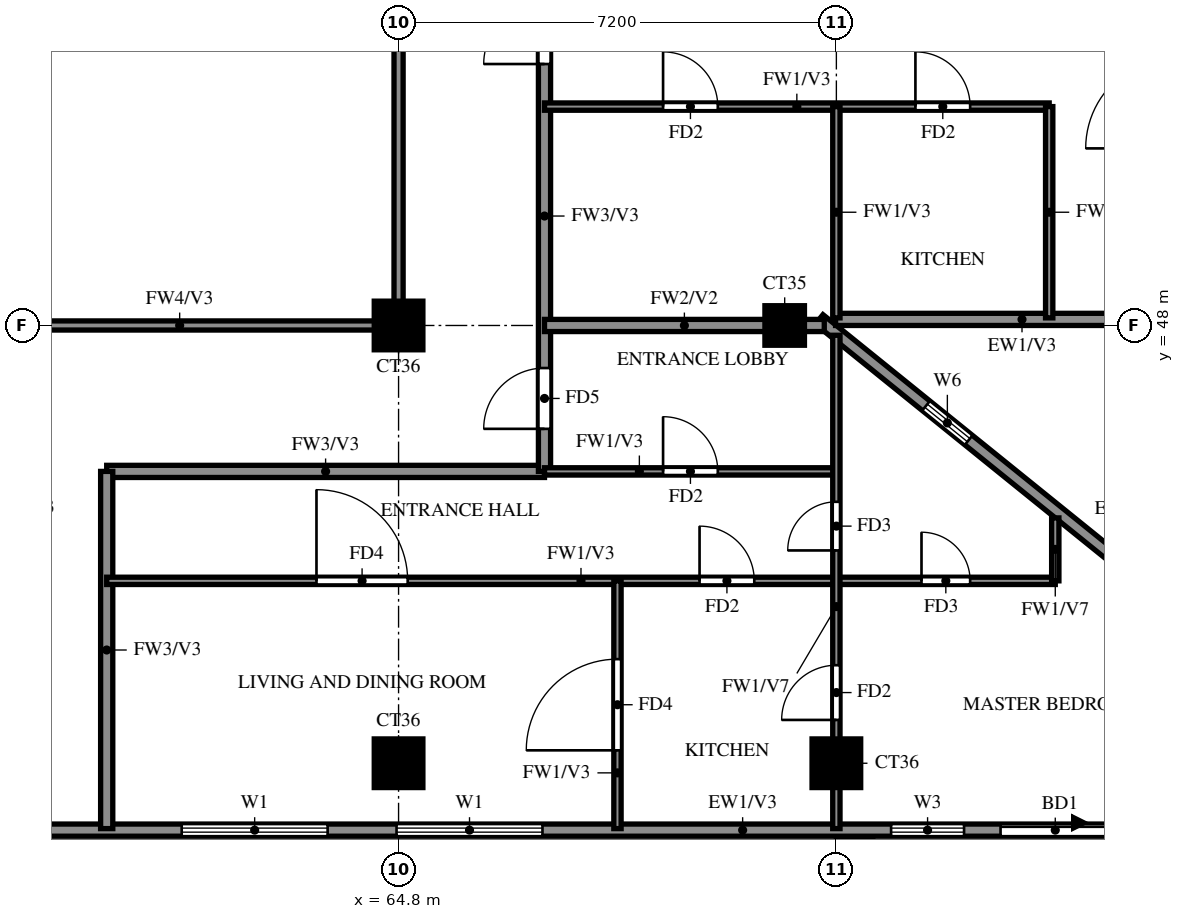
"""IFC4 building model, lengths in metres.
Left out: names, types, materials, properties, quantities, classifications, styles, units other than length and angle.
Written with IfcOpenShell. Run it as: python <this file> out.ifc"""

import sys

from ifc_helpers import new_model, si_unit, direction, frame, frame_2d, origin, origin_2d, place, context, subcontext, project, spatial, rectangle, extrude, source, transform, mapped, element, fill, save


model = new_model("IFC4")
c1 = context("Model", 3, precision=1e-05, world=origin(), true_north=direction((0.0, 1.0)))
c2 = subcontext(c1, "Body", "Model", "MODEL_VIEW")
j1 = project(units=[si_unit("LENGTHUNIT", "METRE"), si_unit("PLANEANGLEUNIT", "RADIAN")], contexts=[c1])
p1 = place(None, origin())
s1 = spatial("IfcSite", under=j1, at=p1, CompositionType="ELEMENT")
p2 = place(p1, origin())
s2 = spatial("IfcBuilding", under=s1, at=p2, CompositionType="ELEMENT")
p3 = place(p2, frame((0.0, 0.0, 243.0)))
s3 = spatial("IfcBuildingStorey", under=s2, at=p3, CompositionType="ELEMENT", Elevation=243.0)
m1 = source(origin(), c2, "Body", "SweptSolid", [
    extrude(rectangle(XDim=0.8, YDim=0.8, at=origin_2d()), origin(), (0.0, 0.0, 1.0), 3.22),
])
for number, where, z_axis, x_axis in (
    (1, (64.8, 40.8, 0.0), (0.0, 0.0, 1.0), (1.0, 0.0, 0.0)),
    (2, (72.0, 40.8, 0.0), (0.0, 0.0, 1.0), (1.0, 0.0, 0.0)),
    (3, (64.8, 48.0, 0.0), (0.0, 0.0, 1.0), (1.0, 0.0, 0.0)),
):
    element("IfcColumn", number, at=place(p3, frame(where, z_axis=z_axis, x_axis=x_axis)), inside=s3, PredefinedType="COLUMN", context=c2, shape_type="MappedRepresentation", body=[
        mapped(m1, transform((0.0, 0.0, 0.0))),
    ])
m2 = source(origin(), c2, "Body", "SweptSolid", [
    extrude(rectangle(XDim=0.65, YDim=0.65, at=origin_2d()), origin(), (0.0, 0.0, 1.0), 3.22),
])
p4 = place(p3, frame((71.15, 48.0, 0.0), z_axis=(0.0, 0.0, 1.0), x_axis=(1.0, 0.0, 0.0)))
e4 = element("IfcColumn", 4, at=p4, inside=s3, PredefinedType="COLUMN", context=c2, shape_type="MappedRepresentation", body=[
    mapped(m2, transform((0.0, 0.0, 0.0))),
])
p5 = place(p3, frame((81.907, 39.87, 0.0), z_axis=(0.0, 0.0, 1.0), x_axis=(-0.777936274417, 0.62834318087, 0.0)))
e5 = element("IfcWall", 5, at=p5, inside=s3, PredefinedType="SOLIDWALL", context=c2, shape_type="SweptSolid", body=[
    extrude(rectangle(XDim=13.099, YDim=0.2, at=frame_2d((6.549, 0.0))), origin(), (0.0, 0.0, 1.0), 3.22),
])
p6 = place(p5, frame((9.938, 0.0, 1.5)))
e6 = element("IfcOpeningElement", 6, at=p6, cuts=e5, PredefinedType="OPENING", context=c2, shape_type="SweptSolid", body=[
    extrude(rectangle(XDim=0.9, YDim=0.9, at=frame_2d((0.45, 0.45))), frame((0.0, 0.11, 0.0), z_axis=(0.0, -1.0, 0.0), x_axis=(1.0, 0.0, 0.0)), (0.0, 0.0, 1.0), 0.22),
])
p7 = place(p3, frame((71.987, 48.1, 0.0), z_axis=(0.0, 0.0, 1.0), x_axis=(1.0, 0.0, 0.0)))
e7 = element("IfcWall", 7, at=p7, inside=s3, PredefinedType="SOLIDWALL", context=c2, shape_type="SweptSolid", body=[
    extrude(rectangle(XDim=6.813, YDim=0.2, at=frame_2d((3.406, 0.0))), origin(), (0.0, 0.0, 1.0), 3.22),
])
p8 = place(p3, frame((58.8, 39.7, 0.0), z_axis=(0.0, 0.0, 1.0), x_axis=(1.0, 0.0, 0.0)))
e8 = element("IfcWall", 8, at=p8, inside=s3, PredefinedType="SOLIDWALL", context=c2, shape_type="SweptSolid", body=[
    extrude(rectangle(XDim=23.317, YDim=0.2, at=frame_2d((11.658, 0.0))), origin(), (0.0, 0.0, 1.0), 3.22),
])
p9 = place(p8, frame((15.9, 0.0, 0.0)))
e9 = element("IfcOpeningElement", 9, at=p9, cuts=e8, PredefinedType="OPENING", context=c2, shape_type="SweptSolid", body=[
    extrude(rectangle(XDim=1.8, YDim=2.4, at=frame_2d((0.9, 1.2))), frame((0.0, 0.11, 0.0), z_axis=(0.0, -1.0, 0.0), x_axis=(1.0, 0.0, 0.0)), (0.0, 0.0, 1.0), 0.22),
])
p10 = place(p8, frame((2.433, 0.0, 0.6)))
e10 = element("IfcOpeningElement", 10, at=p10, cuts=e8, PredefinedType="OPENING", context=c2, shape_type="SweptSolid", body=[
    extrude(rectangle(XDim=2.4, YDim=2.4, at=frame_2d((1.2, 1.2))), frame((0.0, 0.11, 0.0), z_axis=(0.0, -1.0, 0.0), x_axis=(1.0, 0.0, 0.0)), (0.0, 0.0, 1.0), 0.22),
])
p11 = place(p8, frame((5.967, 0.0, 0.6)))
e11 = element("IfcOpeningElement", 11, at=p11, cuts=e8, PredefinedType="OPENING", context=c2, shape_type="SweptSolid", body=[
    extrude(rectangle(XDim=2.4, YDim=2.4, at=frame_2d((1.2, 1.2))), frame((0.0, 0.11, 0.0), z_axis=(0.0, -1.0, 0.0), x_axis=(1.0, 0.0, 0.0)), (0.0, 0.0, 1.0), 0.22),
])
p12 = place(p8, frame((14.1, 0.0, 0.6)))
e12 = element("IfcOpeningElement", 12, at=p12, cuts=e8, PredefinedType="OPENING", context=c2, shape_type="SweptSolid", body=[
    extrude(rectangle(XDim=1.2, YDim=2.4, at=frame_2d((0.6, 1.2))), frame((0.0, 0.11, 0.0), z_axis=(0.0, -1.0, 0.0), x_axis=(1.0, 0.0, 0.0)), (0.0, 0.0, 1.0), 0.22),
])
p13 = place(p8, frame((18.3, 0.0, 0.6)))
e13 = element("IfcOpeningElement", 13, at=p13, cuts=e8, PredefinedType="OPENING", context=c2, shape_type="SweptSolid", body=[
    extrude(rectangle(XDim=1.2, YDim=2.4, at=frame_2d((0.6, 1.2))), frame((0.0, 0.11, 0.0), z_axis=(0.0, -1.0, 0.0), x_axis=(1.0, 0.0, 0.0)), (0.0, 0.0, 1.0), 0.22),
])
p14 = place(p8, frame((20.858, 0.0, 0.6)))
e14 = element("IfcOpeningElement", 14, at=p14, cuts=e8, PredefinedType="OPENING", context=c2, shape_type="SweptSolid", body=[
    extrude(rectangle(XDim=1.8, YDim=2.4, at=frame_2d((0.9, 1.2))), frame((0.0, 0.11, 0.0), z_axis=(0.0, -1.0, 0.0), x_axis=(1.0, 0.0, 0.0)), (0.0, 0.0, 1.0), 0.22),
])
p15 = place(p3, frame((60.0, 45.6, 0.0), z_axis=(0.0, 0.0, 1.0), x_axis=(1.0, 0.0, 0.0)))
e15 = element("IfcWall", 15, at=p15, inside=s3, PredefinedType="SOLIDWALL", context=c2, shape_type="SweptSolid", body=[
    extrude(rectangle(XDim=7.2, YDim=0.2, at=frame_2d((3.6, 0.0))), origin(), (0.0, 0.0, 1.0), 3.22),
])
p16 = place(p3, frame((60.0, 39.725, 0.0), z_axis=(0.0, 0.0, 1.0), x_axis=(0.0, 1.0, 0.0)))
e16 = element("IfcWall", 16, at=p16, inside=s3, PredefinedType="SOLIDWALL", context=c2, shape_type="SweptSolid", body=[
    extrude(rectangle(XDim=5.875, YDim=0.2, at=frame_2d((2.938, 0.0))), origin(), (0.0, 0.0, 1.0), 3.22),
])
p17 = place(p3, frame((67.2, 45.6, 0.0), z_axis=(0.0, 0.0, 1.0), x_axis=(0.0, 1.0, 0.0)))
e17 = element("IfcWall", 17, at=p17, inside=s3, PredefinedType="SOLIDWALL", context=c2, shape_type="SweptSolid", body=[
    extrude(rectangle(XDim=8.4, YDim=0.2, at=frame_2d((4.2, 0.0))), origin(), (0.0, 0.0, 1.0), 3.22),
])
p18 = place(p17, frame((6.7, 0.0, 0.0)))
e18 = element("IfcOpeningElement", 18, at=p18, cuts=e17, PredefinedType="OPENING", context=c2, shape_type="SweptSolid", body=[
    extrude(rectangle(XDim=1.0, YDim=2.1, at=frame_2d((0.5, 1.05))), frame((0.0, 0.11, 0.0), z_axis=(0.0, -1.0, 0.0), x_axis=(1.0, 0.0, 0.0)), (0.0, 0.0, 1.0), 0.22),
])
p19 = place(p17, frame((0.7, 0.0, 0.0)))
e19 = element("IfcOpeningElement", 19, at=p19, cuts=e17, PredefinedType="OPENING", context=c2, shape_type="SweptSolid", body=[
    extrude(rectangle(XDim=1.0, YDim=2.1, at=frame_2d((0.5, 1.05))), frame((0.0, 0.11, 0.0), z_axis=(0.0, -1.0, 0.0), x_axis=(1.0, 0.0, 0.0)), (0.0, 0.0, 1.0), 0.22),
])
p20 = place(p3, frame((67.2, 48.0, 0.0), z_axis=(0.0, 0.0, 1.0), x_axis=(1.0, 0.0, 0.0)))
e20 = element("IfcWall", 20, at=p20, inside=s3, PredefinedType="SOLIDWALL", context=c2, shape_type="SweptSolid", body=[
    extrude(rectangle(XDim=4.601, YDim=0.2, at=frame_2d((2.301, 0.0))), origin(), (0.0, 0.0, 1.0), 3.22),
])
p21 = place(p3, frame((60.0, 43.8, 0.0), z_axis=(0.0, 0.0, 1.0), x_axis=(1.0, 0.0, 0.0)))
e21 = element("IfcWall", 21, at=p21, inside=s3, PredefinedType="PARTITIONING", context=c2, shape_type="SweptSolid", body=[
    extrude(rectangle(XDim=15.6, YDim=0.12, at=frame_2d((7.8, 0.0))), origin(), (0.0, 0.0, 1.0), 3.22),
])
p22 = place(p21, frame((9.75, 0.0, 0.0)))
e22 = element("IfcOpeningElement", 22, at=p22, cuts=e21, PredefinedType="OPENING", context=c2, shape_type="SweptSolid", body=[
    extrude(rectangle(XDim=0.9, YDim=2.1, at=frame_2d((0.45, 1.05))), frame((0.0, 0.07, 0.0), z_axis=(0.0, -1.0, 0.0), x_axis=(1.0, 0.0, 0.0)), (0.0, 0.0, 1.0), 0.14),
])
p23 = place(p21, frame((3.45, 0.0, 0.0)))
e23 = element("IfcOpeningElement", 23, at=p23, cuts=e21, PredefinedType="OPENING", context=c2, shape_type="SweptSolid", body=[
    extrude(rectangle(XDim=1.5, YDim=2.1, at=frame_2d((0.75, 1.05))), frame((0.0, 0.07, 0.0), z_axis=(0.0, -1.0, 0.0), x_axis=(1.0, 0.0, 0.0)), (0.0, 0.0, 1.0), 0.14),
])
p24 = place(p21, frame((13.4, 0.0, 0.0)))
e24 = element("IfcOpeningElement", 24, at=p24, cuts=e21, PredefinedType="OPENING", context=c2, shape_type="SweptSolid", body=[
    extrude(rectangle(XDim=0.8, YDim=2.1, at=frame_2d((0.4, 1.05))), frame((0.0, 0.07, 0.0), z_axis=(0.0, -1.0, 0.0), x_axis=(1.0, 0.0, 0.0)), (0.0, 0.0, 1.0), 0.14),
])
p25 = place(p3, frame((67.2, 45.6, 0.0), z_axis=(0.0, 0.0, 1.0), x_axis=(1.0, 0.0, 0.0)))
e25 = element("IfcWall", 25, at=p25, inside=s3, PredefinedType="PARTITIONING", context=c2, shape_type="SweptSolid", body=[
    extrude(rectangle(XDim=4.8, YDim=0.12, at=frame_2d((2.4, 0.0))), origin(), (0.0, 0.0, 1.0), 3.22),
])
p26 = place(p25, frame((1.95, 0.0, 0.0)))
e26 = element("IfcOpeningElement", 26, at=p26, cuts=e25, PredefinedType="OPENING", context=c2, shape_type="SweptSolid", body=[
    extrude(rectangle(XDim=0.9, YDim=2.1, at=frame_2d((0.45, 1.05))), frame((0.0, 0.07, 0.0), z_axis=(0.0, -1.0, 0.0), x_axis=(1.0, 0.0, 0.0)), (0.0, 0.0, 1.0), 0.14),
])
p27 = place(p3, frame((67.2, 51.6, 0.0), z_axis=(0.0, 0.0, 1.0), x_axis=(1.0, 0.0, 0.0)))
e27 = element("IfcWall", 27, at=p27, inside=s3, PredefinedType="PARTITIONING", context=c2, shape_type="SweptSolid", body=[
    extrude(rectangle(XDim=8.3, YDim=0.12, at=frame_2d((4.15, 0.0))), origin(), (0.0, 0.0, 1.0), 3.22),
])
p28 = place(p27, frame((6.1, 0.0, 0.0)))
e28 = element("IfcOpeningElement", 28, at=p28, cuts=e27, PredefinedType="OPENING", context=c2, shape_type="SweptSolid", body=[
    extrude(rectangle(XDim=0.9, YDim=2.1, at=frame_2d((0.45, 1.05))), frame((0.0, 0.07, 0.0), z_axis=(0.0, -1.0, 0.0), x_axis=(1.0, 0.0, 0.0)), (0.0, 0.0, 1.0), 0.14),
])
p29 = place(p27, frame((1.95, 0.0, 0.0)))
e29 = element("IfcOpeningElement", 29, at=p29, cuts=e27, PredefinedType="OPENING", context=c2, shape_type="SweptSolid", body=[
    extrude(rectangle(XDim=0.9, YDim=2.1, at=frame_2d((0.45, 1.05))), frame((0.0, 0.07, 0.0), z_axis=(0.0, -1.0, 0.0), x_axis=(1.0, 0.0, 0.0)), (0.0, 0.0, 1.0), 0.14),
])
p30 = place(p3, frame((68.4, 39.725, 0.0), z_axis=(0.0, 0.0, 1.0), x_axis=(0.0, 1.0, 0.0)))
e30 = element("IfcWall", 30, at=p30, inside=s3, PredefinedType="PARTITIONING", context=c2, shape_type="SweptSolid", body=[
    extrude(rectangle(XDim=4.075, YDim=0.12, at=frame_2d((2.038, 0.0))), origin(), (0.0, 0.0, 1.0), 3.22),
])
p31 = place(p30, frame((1.288, 0.0, 0.0)))
e31 = element("IfcOpeningElement", 31, at=p31, cuts=e30, PredefinedType="OPENING", context=c2, shape_type="SweptSolid", body=[
    extrude(rectangle(XDim=1.5, YDim=2.1, at=frame_2d((0.75, 1.05))), frame((0.0, 0.07, 0.0), z_axis=(0.0, -1.0, 0.0), x_axis=(1.0, 0.0, 0.0)), (0.0, 0.0, 1.0), 0.14),
])
p32 = place(p3, frame((72.0, 39.725, 0.0), z_axis=(0.0, 0.0, 1.0), x_axis=(0.0, 1.0, 0.0)))
e32 = element("IfcWall", 32, at=p32, inside=s3, PredefinedType="PARTITIONING", context=c2, shape_type="SweptSolid", body=[
    extrude(rectangle(XDim=8.114, YDim=0.12, at=frame_2d((4.057, 0.0))), origin(), (0.0, 0.0, 1.0), 2.32),
])
p33 = place(p32, frame((1.788, 0.0, 0.0)))
e33 = element("IfcOpeningElement", 33, at=p33, cuts=e32, PredefinedType="OPENING", context=c2, shape_type="SweptSolid", body=[
    extrude(rectangle(XDim=0.9, YDim=2.1, at=frame_2d((0.45, 1.05))), frame((0.0, 0.07, 0.0), z_axis=(0.0, -1.0, 0.0), x_axis=(1.0, 0.0, 0.0)), (0.0, 0.0, 1.0), 0.14),
])
p34 = place(p32, frame((4.575, 0.0, 0.0)))
e34 = element("IfcOpeningElement", 34, at=p34, cuts=e32, PredefinedType="OPENING", context=c2, shape_type="SweptSolid", body=[
    extrude(rectangle(XDim=0.8, YDim=2.1, at=frame_2d((0.4, 1.05))), frame((0.0, 0.07, 0.0), z_axis=(0.0, -1.0, 0.0), x_axis=(1.0, 0.0, 0.0)), (0.0, 0.0, 1.0), 0.14),
])
for number, where, z_axis, x_axis in (
    (35, (72.0, 48.125, 0.0), (0.0, 0.0, 1.0), (0.0, 1.0, 0.0)),
    (36, (75.5, 48.125, 0.0), (0.0, 0.0, 1.0), (0.0, 1.0, 0.0)),
):
    element("IfcWall", number, at=place(p3, frame(where, z_axis=z_axis, x_axis=x_axis)), inside=s3, PredefinedType="PARTITIONING", context=c2, shape_type="SweptSolid", body=[
        extrude(rectangle(XDim=3.475, YDim=0.12, at=frame_2d((1.738, 0.0))), origin(), (0.0, 0.0, 1.0), 3.22),
    ])
p35 = place(p3, frame((75.6, 43.8, 0.0), z_axis=(0.0, 0.0, 1.0), x_axis=(0.0, 1.0, 0.0)))
e37 = element("IfcWall", 37, at=p35, inside=s3, PredefinedType="PARTITIONING", context=c2, shape_type="SweptSolid", body=[
    extrude(rectangle(XDim=1.035, YDim=0.12, at=frame_2d((0.518, 0.0))), origin(), (0.0, 0.0, 1.0), 2.32),
])
p36 = place(p3, frame((57.6, 48.0, 0.0), z_axis=(0.0, 0.0, 1.0), x_axis=(1.0, 0.0, 0.0)))
e38 = element("IfcWall", 38, at=p36, inside=s3, PredefinedType="SOLIDWALL", context=c2, shape_type="SweptSolid", body=[
    extrude(rectangle(XDim=7.2, YDim=0.15, at=frame_2d((3.6, 0.0))), origin(), (0.0, 0.0, 1.0), 2.32),
])
p37 = place(p3, frame((64.8, 48.0, 0.0), z_axis=(0.0, 0.0, 1.0), x_axis=(0.0, 1.0, 0.0)))
e39 = element("IfcWall", 39, at=p37, inside=s3, PredefinedType="SOLIDWALL", context=c2, shape_type="SweptSolid", body=[
    extrude(rectangle(XDim=14.4, YDim=0.15, at=frame_2d((7.2, 0.0))), origin(), (0.0, 0.0, 1.0), 2.32),
])
p38 = place(p6, origin())
e40 = element("IfcWindow", 40, at=p38, inside=s3, PartitioningType="SINGLE_PANEL", PredefinedType="WINDOW", context=c2, shape_type="SweptSolid", body=[
    extrude(rectangle(XDim=0.9, YDim=0.9, at=frame_2d((0.45, 0.45))), frame((0.0, 0.03, 0.0), z_axis=(0.0, -1.0, 0.0), x_axis=(1.0, 0.0, 0.0)), (0.0, 0.0, 1.0), 0.06),
])
fill(e6, e40)
p39 = place(p9, origin())
e41 = element("IfcDoor", 41, at=p39, inside=s3, OperationType="DOUBLE_DOOR_SLIDING", PredefinedType="DOOR", context=c2, shape_type="SweptSolid", body=[
    extrude(rectangle(XDim=1.8, YDim=2.4, at=frame_2d((0.9, 1.2))), frame((0.0, 0.025, 0.0), z_axis=(0.0, -1.0, 0.0), x_axis=(1.0, 0.0, 0.0)), (0.0, 0.0, 1.0), 0.05),
])
fill(e9, e41)
p40 = place(p10, origin())
e42 = element("IfcWindow", 42, at=p40, inside=s3, PartitioningType="DOUBLE_PANEL_VERTICAL", PredefinedType="WINDOW", context=c2, shape_type="SweptSolid", body=[
    extrude(rectangle(XDim=2.4, YDim=2.4, at=frame_2d((1.2, 1.2))), frame((0.0, 0.03, 0.0), z_axis=(0.0, -1.0, 0.0), x_axis=(1.0, 0.0, 0.0)), (0.0, 0.0, 1.0), 0.06),
])
fill(e10, e42)
p41 = place(p11, origin())
e43 = element("IfcWindow", 43, at=p41, inside=s3, PartitioningType="DOUBLE_PANEL_VERTICAL", PredefinedType="WINDOW", context=c2, shape_type="SweptSolid", body=[
    extrude(rectangle(XDim=2.4, YDim=2.4, at=frame_2d((1.2, 1.2))), frame((0.0, 0.03, 0.0), z_axis=(0.0, -1.0, 0.0), x_axis=(1.0, 0.0, 0.0)), (0.0, 0.0, 1.0), 0.06),
])
fill(e11, e43)
p42 = place(p12, origin())
e44 = element("IfcWindow", 44, at=p42, inside=s3, PartitioningType="SINGLE_PANEL", PredefinedType="WINDOW", context=c2, shape_type="SweptSolid", body=[
    extrude(rectangle(XDim=1.2, YDim=2.4, at=frame_2d((0.6, 1.2))), frame((0.0, 0.03, 0.0), z_axis=(0.0, -1.0, 0.0), x_axis=(1.0, 0.0, 0.0)), (0.0, 0.0, 1.0), 0.06),
])
fill(e12, e44)
p43 = place(p18, origin())
e45 = element("IfcDoor", 45, at=p43, inside=s3, OperationType="SINGLE_SWING_RIGHT", PredefinedType="DOOR", context=c2, shape_type="SweptSolid", body=[
    extrude(rectangle(XDim=1.0, YDim=2.1, at=frame_2d((0.5, 1.05))), frame((0.0, 0.025, 0.0), z_axis=(0.0, -1.0, 0.0), x_axis=(1.0, 0.0, 0.0)), (0.0, 0.0, 1.0), 0.05),
])
fill(e18, e45)
p44 = place(p28, origin())
e46 = element("IfcDoor", 46, at=p44, inside=s3, OperationType="SINGLE_SWING_RIGHT", PredefinedType="DOOR", context=c2, shape_type="SweptSolid", body=[
    extrude(rectangle(XDim=0.9, YDim=2.1, at=frame_2d((0.45, 1.05))), frame((0.0, 0.025, 0.0), z_axis=(0.0, -1.0, 0.0), x_axis=(1.0, 0.0, 0.0)), (0.0, 0.0, 1.0), 0.05),
])
fill(e28, e46)
p45 = place(p29, origin())
e47 = element("IfcDoor", 47, at=p45, inside=s3, OperationType="SINGLE_SWING_LEFT", PredefinedType="DOOR", context=c2, shape_type="SweptSolid", body=[
    extrude(rectangle(XDim=0.9, YDim=2.1, at=frame_2d((0.45, 1.05))), frame((0.0, 0.025, 0.0), z_axis=(0.0, -1.0, 0.0), x_axis=(1.0, 0.0, 0.0)), (0.0, 0.0, 1.0), 0.05),
])
fill(e29, e47)
p46 = place(p31, origin())
e48 = element("IfcDoor", 48, at=p46, inside=s3, OperationType="SINGLE_SWING_LEFT", PredefinedType="DOOR", context=c2, shape_type="SweptSolid", body=[
    extrude(rectangle(XDim=1.5, YDim=2.1, at=frame_2d((0.75, 1.05))), frame((0.0, 0.025, 0.0), z_axis=(0.0, -1.0, 0.0), x_axis=(1.0, 0.0, 0.0)), (0.0, 0.0, 1.0), 0.05),
])
fill(e31, e48)
p47 = place(p26, origin())
e49 = element("IfcDoor", 49, at=p47, inside=s3, OperationType="SINGLE_SWING_RIGHT", PredefinedType="DOOR", context=c2, shape_type="SweptSolid", body=[
    extrude(rectangle(XDim=0.9, YDim=2.1, at=frame_2d((0.45, 1.05))), frame((0.0, 0.025, 0.0), z_axis=(0.0, -1.0, 0.0), x_axis=(1.0, 0.0, 0.0)), (0.0, 0.0, 1.0), 0.05),
])
fill(e26, e49)
p48 = place(p19, origin())
e50 = element("IfcDoor", 50, at=p48, inside=s3, OperationType="SINGLE_SWING_LEFT", PredefinedType="DOOR", context=c2, shape_type="SweptSolid", body=[
    extrude(rectangle(XDim=1.0, YDim=2.1, at=frame_2d((0.5, 1.05))), frame((0.0, 0.025, 0.0), z_axis=(0.0, -1.0, 0.0), x_axis=(1.0, 0.0, 0.0)), (0.0, 0.0, 1.0), 0.05),
])
fill(e19, e50)
p49 = place(p22, origin())
e51 = element("IfcDoor", 51, at=p49, inside=s3, OperationType="SINGLE_SWING_LEFT", PredefinedType="DOOR", context=c2, shape_type="SweptSolid", body=[
    extrude(rectangle(XDim=0.9, YDim=2.1, at=frame_2d((0.45, 1.05))), frame((0.0, 0.025, 0.0), z_axis=(0.0, -1.0, 0.0), x_axis=(1.0, 0.0, 0.0)), (0.0, 0.0, 1.0), 0.05),
])
fill(e22, e51)
p50 = place(p23, origin())
e52 = element("IfcDoor", 52, at=p50, inside=s3, OperationType="SINGLE_SWING_RIGHT", PredefinedType="DOOR", context=c2, shape_type="SweptSolid", body=[
    extrude(rectangle(XDim=1.5, YDim=2.1, at=frame_2d((0.75, 1.05))), frame((0.0, 0.025, 0.0), z_axis=(0.0, -1.0, 0.0), x_axis=(1.0, 0.0, 0.0)), (0.0, 0.0, 1.0), 0.05),
])
fill(e23, e52)
p51 = place(p33, origin())
e53 = element("IfcDoor", 53, at=p51, inside=s3, OperationType="SINGLE_SWING_RIGHT", PredefinedType="DOOR", context=c2, shape_type="SweptSolid", body=[
    extrude(rectangle(XDim=0.9, YDim=2.1, at=frame_2d((0.45, 1.05))), frame((0.0, 0.025, 0.0), z_axis=(0.0, -1.0, 0.0), x_axis=(1.0, 0.0, 0.0)), (0.0, 0.0, 1.0), 0.05),
])
fill(e33, e53)
p52 = place(p34, origin())
e54 = element("IfcDoor", 54, at=p52, inside=s3, OperationType="SINGLE_SWING_LEFT", PredefinedType="DOOR", context=c2, shape_type="SweptSolid", body=[
    extrude(rectangle(XDim=0.8, YDim=2.1, at=frame_2d((0.4, 1.05))), frame((0.0, 0.025, 0.0), z_axis=(0.0, -1.0, 0.0), x_axis=(1.0, 0.0, 0.0)), (0.0, 0.0, 1.0), 0.05),
])
fill(e34, e54)
p53 = place(p24, origin())
e55 = element("IfcDoor", 55, at=p53, inside=s3, OperationType="SINGLE_SWING_RIGHT", PredefinedType="DOOR", context=c2, shape_type="SweptSolid", body=[
    extrude(rectangle(XDim=0.8, YDim=2.1, at=frame_2d((0.4, 1.05))), frame((0.0, 0.025, 0.0), z_axis=(0.0, -1.0, 0.0), x_axis=(1.0, 0.0, 0.0)), (0.0, 0.0, 1.0), 0.05),
])
fill(e24, e55)
save(model, sys.argv[1])
